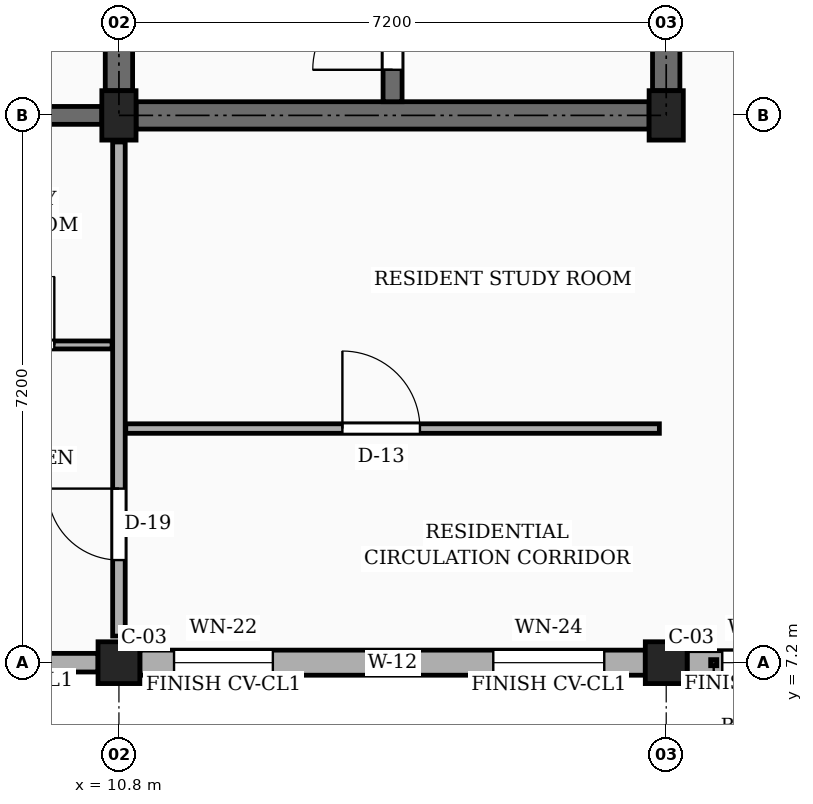
"""IFC4 building model, lengths in metres.
Left out: names, types, materials, properties, quantities, classifications, styles, units other than length and angle.
Written with IfcOpenShell. Run it as: python <this file> out.ifc"""

import sys

from ifc_helpers import new_model, si_unit, direction, frame, frame_2d, origin, origin_2d, place, context, subcontext, project, spatial, rectangle, extrude, element, fill, save


model = new_model("IFC4")
c1 = context("Model", 3, precision=1e-05, world=origin(), true_north=direction((0.0, 1.0)))
c2 = subcontext(c1, "Body", "Model", "MODEL_VIEW")
j1 = project(units=[si_unit("LENGTHUNIT", "METRE"), si_unit("PLANEANGLEUNIT", "RADIAN")], contexts=[c1])
p1 = place(None, origin())
s1 = spatial("IfcSite", under=j1, at=p1, CompositionType="ELEMENT")
p2 = place(p1, origin())
s2 = spatial("IfcBuilding", under=s1, at=p2, CompositionType="ELEMENT")
p3 = place(p2, frame((0.0, 0.0, 20.25)))
s3 = spatial("IfcBuildingStorey", under=s2, at=p3, CompositionType="ELEMENT", Elevation=20.25)
p4 = place(p3, frame((10.8, 7.2, 0.0), z_axis=(0.0, 0.0, 1.0), x_axis=(1.0, 0.0, 0.0)))
e1 = element("IfcColumn", 1, at=p4, inside=s3, PredefinedType="COLUMN", context=c2, shape_type="SweptSolid", body=[
    extrude(rectangle(XDim=0.55, YDim=0.55, at=origin_2d()), origin(), (0.0, 0.0, 1.0), 3.15),
])
p5 = place(p3, frame((10.8, 14.4, 0.0), z_axis=(0.0, 0.0, 1.0), x_axis=(1.0, 0.0, 0.0)))
e2 = element("IfcColumn", 2, at=p5, inside=s3, PredefinedType="COLUMN", context=c2, shape_type="SweptSolid", body=[
    extrude(rectangle(XDim=0.45, YDim=0.65, at=origin_2d()), origin(), (0.0, 0.0, 1.0), 3.15),
])
p6 = place(p3, frame((18.0, 7.2, 0.0), z_axis=(0.0, 0.0, 1.0), x_axis=(1.0, 0.0, 0.0)))
e3 = element("IfcColumn", 3, at=p6, inside=s3, PredefinedType="COLUMN", context=c2, shape_type="SweptSolid", body=[
    extrude(rectangle(XDim=0.55, YDim=0.55, at=origin_2d()), origin(), (0.0, 0.0, 1.0), 3.15),
])
p7 = place(p3, frame((18.0, 14.4, 0.0), z_axis=(0.0, 0.0, 1.0), x_axis=(1.0, 0.0, 0.0)))
e4 = element("IfcColumn", 4, at=p7, inside=s3, PredefinedType="COLUMN", context=c2, shape_type="SweptSolid", body=[
    extrude(rectangle(XDim=0.45, YDim=0.65, at=origin_2d()), origin(), (0.0, 0.0, 1.0), 3.15),
])
p8 = place(p3, frame((3.875, 14.4, 0.0), z_axis=(0.0, 0.0, 1.0), x_axis=(1.0, 0.0, 0.0)))
e5 = element("IfcWall", 5, at=p8, inside=s3, PredefinedType="SOLIDWALL", context=c2, shape_type="SweptSolid", body=[
    extrude(rectangle(XDim=6.7, YDim=0.235, at=frame_2d((3.35, 0.0))), origin(), (0.0, 0.0, 1.0), 2.17),
])
p9 = place(p8, frame((1.35, 0.0, 0.0)))
e6 = element("IfcOpeningElement", 6, at=p9, cuts=e5, PredefinedType="OPENING", context=c2, shape_type="SweptSolid", body=[
    extrude(rectangle(XDim=0.98, YDim=2.12, at=frame_2d((0.49, 1.06))), frame((0.0, 0.127, 0.0), z_axis=(0.0, -1.0, 0.0), x_axis=(1.0, 0.0, 0.0)), (0.0, 0.0, 1.0), 0.255),
])
p10 = place(p3, frame((3.875, 7.2, 0.0), z_axis=(0.0, 0.0, 1.0), x_axis=(1.0, 0.0, 0.0)))
e7 = element("IfcWall", 7, at=p10, inside=s3, PredefinedType="SOLIDWALL", context=c2, shape_type="SweptSolid", body=[
    extrude(rectangle(XDim=6.65, YDim=0.245, at=frame_2d((3.325, 0.0))), origin(), (0.0, 0.0, 1.0), 2.44),
])
p11 = place(p10, frame((0.45, 0.0, 0.78)))
e8 = element("IfcOpeningElement", 8, at=p11, cuts=e7, PredefinedType="OPENING", context=c2, shape_type="SweptSolid", body=[
    extrude(rectangle(XDim=1.14, YDim=1.36, at=frame_2d((0.57, 0.68))), frame((0.0, 0.133, 0.0), z_axis=(0.0, -1.0, 0.0), x_axis=(1.0, 0.0, 0.0)), (0.0, 0.0, 1.0), 0.265),
])
p12 = place(p10, frame((4.65, 0.0, 0.78)))
e9 = element("IfcOpeningElement", 9, at=p12, cuts=e7, PredefinedType="OPENING", context=c2, shape_type="SweptSolid", body=[
    extrude(rectangle(XDim=1.3, YDim=1.36, at=frame_2d((0.65, 0.68))), frame((0.0, 0.133, 0.0), z_axis=(0.0, -1.0, 0.0), x_axis=(1.0, 0.0, 0.0)), (0.0, 0.0, 1.0), 0.265),
])
p13 = place(p3, frame((11.075, 7.2, 0.0), z_axis=(0.0, 0.0, 1.0), x_axis=(1.0, 0.0, 0.0)))
e10 = element("IfcWall", 10, at=p13, inside=s3, PredefinedType="SOLIDWALL", context=c2, shape_type="SweptSolid", body=[
    extrude(rectangle(XDim=6.65, YDim=0.33, at=frame_2d((3.325, 0.0))), origin(), (0.0, 0.0, 1.0), 2.44),
])
p14 = place(p13, frame((0.45, 0.0, 0.78)))
e11 = element("IfcOpeningElement", 11, at=p14, cuts=e10, PredefinedType="OPENING", context=c2, shape_type="SweptSolid", body=[
    extrude(rectangle(XDim=1.3, YDim=1.36, at=frame_2d((0.65, 0.68))), frame((0.0, 0.175, 0.0), z_axis=(0.0, -1.0, 0.0), x_axis=(1.0, 0.0, 0.0)), (0.0, 0.0, 1.0), 0.35),
])
p15 = place(p13, frame((4.65, 0.0, 0.78)))
e12 = element("IfcOpeningElement", 12, at=p15, cuts=e10, PredefinedType="OPENING", context=c2, shape_type="SweptSolid", body=[
    extrude(rectangle(XDim=1.46, YDim=1.36, at=frame_2d((0.73, 0.68))), frame((0.0, 0.175, 0.0), z_axis=(0.0, -1.0, 0.0), x_axis=(1.0, 0.0, 0.0)), (0.0, 0.0, 1.0), 0.35),
])
p16 = place(p3, frame((18.275, 7.2, 0.0), z_axis=(0.0, 0.0, 1.0), x_axis=(1.0, 0.0, 0.0)))
e13 = element("IfcWall", 13, at=p16, inside=s3, PredefinedType="SOLIDWALL", context=c2, shape_type="SweptSolid", body=[
    extrude(rectangle(XDim=6.65, YDim=0.315, at=frame_2d((3.325, 0.0))), origin(), (0.0, 0.0, 1.0), 2.44),
])
p17 = place(p16, frame((0.462, 0.0, 0.78)))
e14 = element("IfcOpeningElement", 14, at=p17, cuts=e13, PredefinedType="OPENING", context=c2, shape_type="SweptSolid", body=[
    extrude(rectangle(XDim=1.04, YDim=1.26, at=frame_2d((0.52, 0.63))), frame((0.0, 0.167, 0.0), z_axis=(0.0, -1.0, 0.0), x_axis=(1.0, 0.0, 0.0)), (0.0, 0.0, 1.0), 0.335),
])
p18 = place(p16, frame((2.775, 0.0, 0.78)))
e15 = element("IfcOpeningElement", 15, at=p18, cuts=e13, PredefinedType="OPENING", context=c2, shape_type="SweptSolid", body=[
    extrude(rectangle(XDim=1.05, YDim=1.44, at=frame_2d((0.525, 0.72))), frame((0.0, 0.167, 0.0), z_axis=(0.0, -1.0, 0.0), x_axis=(1.0, 0.0, 0.0)), (0.0, 0.0, 1.0), 0.335),
])
p19 = place(p16, frame((5.123, 0.0, 0.78)))
e16 = element("IfcOpeningElement", 16, at=p19, cuts=e13, PredefinedType="OPENING", context=c2, shape_type="SweptSolid", body=[
    extrude(rectangle(XDim=1.04, YDim=1.26, at=frame_2d((0.52, 0.63))), frame((0.0, 0.167, 0.0), z_axis=(0.0, -1.0, 0.0), x_axis=(1.0, 0.0, 0.0)), (0.0, 0.0, 1.0), 0.335),
])
p20 = place(p3, frame((10.8, 14.725, 0.0), z_axis=(0.0, 0.0, 1.0), x_axis=(0.0, 1.0, 0.0)))
e17 = element("IfcWall", 17, at=p20, inside=s3, PredefinedType="SHEAR", context=c2, shape_type="SweptSolid", body=[
    extrude(rectangle(XDim=6.55, YDim=0.36, at=frame_2d((3.275, 0.0))), origin(), (0.0, 0.0, 1.0), 2.87),
])
p21 = place(p3, frame((18.0, 14.725, 0.0), z_axis=(0.0, 0.0, 1.0), x_axis=(0.0, 1.0, 0.0)))
e18 = element("IfcWall", 18, at=p21, inside=s3, PredefinedType="SHEAR", context=c2, shape_type="SweptSolid", body=[
    extrude(rectangle(XDim=6.55, YDim=0.36, at=frame_2d((3.275, 0.0))), origin(), (0.0, 0.0, 1.0), 2.87),
])
p22 = place(p21, frame((1.5, 0.0, 0.0)))
e19 = element("IfcOpeningElement", 19, at=p22, cuts=e18, PredefinedType="OPENING", context=c2, shape_type="SweptSolid", body=[
    extrude(rectangle(XDim=1.1, YDim=2.15, at=frame_2d((0.55, 1.075))), frame((0.0, 0.19, 0.0), z_axis=(0.0, -1.0, 0.0), x_axis=(1.0, 0.0, 0.0)), (0.0, 0.0, 1.0), 0.38),
])
p23 = place(p3, frame((11.025, 14.4, 0.0), z_axis=(0.0, 0.0, 1.0), x_axis=(1.0, 0.0, 0.0)))
e20 = element("IfcWall", 20, at=p23, inside=s3, PredefinedType="SHEAR", context=c2, shape_type="SweptSolid", body=[
    extrude(rectangle(XDim=6.75, YDim=0.36, at=frame_2d((3.375, 0.0))), origin(), (0.0, 0.0, 1.0), 2.87),
])
p24 = place(p3, frame((14.4, 14.58, 0.0), z_axis=(0.0, 0.0, 1.0), x_axis=(0.0, 1.0, 0.0)))
e21 = element("IfcWall", 21, at=p24, inside=s3, PredefinedType="SHEAR", context=c2, shape_type="SweptSolid", body=[
    extrude(rectangle(XDim=6.84, YDim=0.25, at=frame_2d((3.42, 0.0))), origin(), (0.0, 0.0, 1.0), 2.87),
])
p25 = place(p24, frame((0.42, 0.0, 0.0)))
e22 = element("IfcOpeningElement", 22, at=p25, cuts=e21, PredefinedType="OPENING", context=c2, shape_type="SweptSolid", body=[
    extrude(rectangle(XDim=1.05, YDim=2.15, at=frame_2d((0.525, 1.075))), frame((0.0, 0.135, 0.0), z_axis=(0.0, -1.0, 0.0), x_axis=(1.0, 0.0, 0.0)), (0.0, 0.0, 1.0), 0.27),
])
p26 = place(p3, frame((10.8, 7.55, 0.0), z_axis=(0.0, 0.0, 1.0), x_axis=(0.0, 1.0, 0.0)))
e23 = element("IfcWall", 23, at=p26, inside=s3, PredefinedType="PARTITIONING", context=c2, shape_type="SweptSolid", body=[
    extrude(rectangle(XDim=6.5, YDim=0.165, at=frame_2d((3.25, 0.0))), origin(), (0.0, 0.0, 1.0), 2.305),
])
p27 = place(p26, frame((1.0, 0.0, 0.0)))
e24 = element("IfcOpeningElement", 24, at=p27, cuts=e23, PredefinedType="OPENING", context=c2, shape_type="SweptSolid", body=[
    extrude(rectangle(XDim=0.94, YDim=2.12, at=frame_2d((0.47, 1.06))), frame((0.0, 0.093, 0.0), z_axis=(0.0, -1.0, 0.0), x_axis=(1.0, 0.0, 0.0)), (0.0, 0.0, 1.0), 0.185),
])
p28 = place(p3, frame((10.89, 10.28, 0.0), z_axis=(0.0, 0.0, 1.0), x_axis=(1.0, 0.0, 0.0)))
e25 = element("IfcWall", 25, at=p28, inside=s3, PredefinedType="PARTITIONING", context=c2, shape_type="SweptSolid", body=[
    extrude(rectangle(XDim=7.02, YDim=0.125, at=frame_2d((3.51, 0.0))), origin(), (0.0, 0.0, 1.0), 2.305),
])
p29 = place(p28, frame((2.85, 0.0, 0.0)))
e26 = element("IfcOpeningElement", 26, at=p29, cuts=e25, PredefinedType="OPENING", context=c2, shape_type="SweptSolid", body=[
    extrude(rectangle(XDim=1.02, YDim=2.15, at=frame_2d((0.51, 1.075))), frame((0.0, 0.073, 0.0), z_axis=(0.0, -1.0, 0.0), x_axis=(1.0, 0.0, 0.0)), (0.0, 0.0, 1.0), 0.145),
])
p30 = place(p3, frame((8.29, 11.38, 0.0), z_axis=(0.0, 0.0, 1.0), x_axis=(1.0, 0.0, 0.0)))
e27 = element("IfcWall", 27, at=p30, inside=s3, PredefinedType="PARTITIONING", context=c2, shape_type="SweptSolid", body=[
    extrude(rectangle(XDim=2.42, YDim=0.105, at=frame_2d((1.21, 0.0))), origin(), (0.0, 0.0, 1.0), 2.305),
])
p31 = place(p30, frame((0.76, 0.0, 0.0)))
e28 = element("IfcOpeningElement", 28, at=p31, cuts=e27, PredefinedType="OPENING", context=c2, shape_type="SweptSolid", body=[
    extrude(rectangle(XDim=0.9, YDim=2.05, at=frame_2d((0.45, 1.025))), frame((0.0, 0.062, 0.0), z_axis=(0.0, -1.0, 0.0), x_axis=(1.0, 0.0, 0.0)), (0.0, 0.0, 1.0), 0.125),
])
p32 = place(p14, origin())
e29 = element("IfcWindow", 29, at=p32, inside=s3, PartitioningType="SINGLE_PANEL", PredefinedType="WINDOW", context=c2, shape_type="SweptSolid", body=[
    extrude(rectangle(XDim=1.3, YDim=1.36, at=frame_2d((0.65, 0.68))), frame((0.0, 0.03, 0.0), z_axis=(0.0, -1.0, 0.0), x_axis=(1.0, 0.0, 0.0)), (0.0, 0.0, 1.0), 0.06),
])
fill(e11, e29)
p33 = place(p15, origin())
e30 = element("IfcWindow", 30, at=p33, inside=s3, PartitioningType="SINGLE_PANEL", PredefinedType="WINDOW", context=c2, shape_type="SweptSolid", body=[
    extrude(rectangle(XDim=1.46, YDim=1.36, at=frame_2d((0.73, 0.68))), frame((0.0, 0.03, 0.0), z_axis=(0.0, -1.0, 0.0), x_axis=(1.0, 0.0, 0.0)), (0.0, 0.0, 1.0), 0.06),
])
fill(e12, e30)
p34 = place(p17, origin())
e31 = element("IfcWindow", 31, at=p34, inside=s3, PartitioningType="SINGLE_PANEL", PredefinedType="WINDOW", context=c2, shape_type="SweptSolid", body=[
    extrude(rectangle(XDim=1.04, YDim=1.26, at=frame_2d((0.52, 0.63))), frame((0.0, 0.03, 0.0), z_axis=(0.0, -1.0, 0.0), x_axis=(1.0, 0.0, 0.0)), (0.0, 0.0, 1.0), 0.06),
])
fill(e14, e31)
p35 = place(p25, origin())
e32 = element("IfcDoor", 32, at=p35, inside=s3, OperationType="SINGLE_SWING_LEFT", PredefinedType="DOOR", context=c2, shape_type="SweptSolid", body=[
    extrude(rectangle(XDim=1.05, YDim=2.15, at=frame_2d((0.525, 1.075))), frame((0.0, 0.025, 0.0), z_axis=(0.0, -1.0, 0.0), x_axis=(1.0, 0.0, 0.0)), (0.0, 0.0, 1.0), 0.05),
])
fill(e22, e32)
p36 = place(p27, origin())
e33 = element("IfcDoor", 33, at=p36, inside=s3, OperationType="SINGLE_SWING_RIGHT", PredefinedType="DOOR", context=c2, shape_type="SweptSolid", body=[
    extrude(rectangle(XDim=0.94, YDim=2.12, at=frame_2d((0.47, 1.06))), frame((0.0, 0.025, 0.0), z_axis=(0.0, -1.0, 0.0), x_axis=(1.0, 0.0, 0.0)), (0.0, 0.0, 1.0), 0.05),
])
fill(e24, e33)
p37 = place(p29, origin())
e34 = element("IfcDoor", 34, at=p37, inside=s3, OperationType="SINGLE_SWING_LEFT", PredefinedType="DOOR", context=c2, shape_type="SweptSolid", body=[
    extrude(rectangle(XDim=1.02, YDim=2.15, at=frame_2d((0.51, 1.075))), frame((0.0, 0.025, 0.0), z_axis=(0.0, -1.0, 0.0), x_axis=(1.0, 0.0, 0.0)), (0.0, 0.0, 1.0), 0.05),
])
fill(e26, e34)
p38 = place(p31, origin())
e35 = element("IfcDoor", 35, at=p38, inside=s3, OperationType="SINGLE_SWING_RIGHT", PredefinedType="DOOR", context=c2, shape_type="SweptSolid", body=[
    extrude(rectangle(XDim=0.9, YDim=2.05, at=frame_2d((0.45, 1.025))), frame((0.0, 0.025, 0.0), z_axis=(0.0, -1.0, 0.0), x_axis=(1.0, 0.0, 0.0)), (0.0, 0.0, 1.0), 0.05),
])
fill(e28, e35)
save(model, sys.argv[1])
